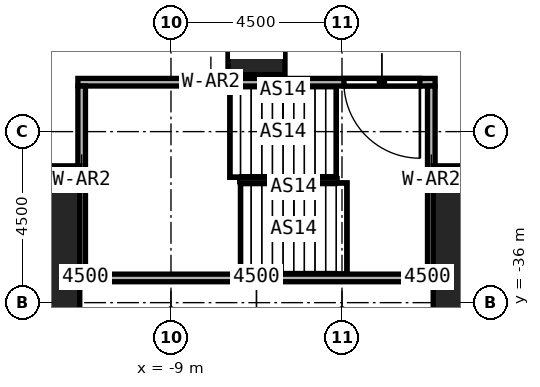
"""IFC4 building model, lengths in metres.
Left out: names, types, materials, properties, quantities, classifications, styles, units other than length and angle.
Written with IfcOpenShell. Run it as: python <this file> out.ifc"""

import sys

from ifc_helpers import new_model, si_unit, direction, frame, frame_2d, origin, origin_2d, place, context, subcontext, project, spatial, rectangle, extrude, element, fill, save


model = new_model("IFC4")
c1 = context("Model", 3, precision=1e-05, world=origin(), true_north=direction((0.0, 1.0)))
c2 = subcontext(c1, "Body", "Model", "MODEL_VIEW")
j1 = project(units=[si_unit("LENGTHUNIT", "METRE"), si_unit("PLANEANGLEUNIT", "RADIAN")], contexts=[c1])
p1 = place(None, origin())
s1 = spatial("IfcSite", under=j1, at=p1, CompositionType="ELEMENT")
p2 = place(p1, origin())
s2 = spatial("IfcBuilding", under=s1, at=p2, CompositionType="ELEMENT")
p3 = place(p2, frame((0.0, 0.0, 12.0)))
s3 = spatial("IfcBuildingStorey", under=s2, at=p3, CompositionType="ELEMENT", Elevation=12.0)
for number, where, z_axis, x_axis in (
    (1, (-13.5, -35.7, 0.0), (0.0, 0.0, 1.0), (1.0, 0.0, 0.0)),
    (2, (0.0, -35.7, 0.0), (0.0, 0.0, 1.0), (1.0, 0.0, 0.0)),
):
    element("IfcColumn", number, at=place(p3, frame(where, z_axis=z_axis, x_axis=x_axis)), inside=s3, PredefinedType="COLUMN", context=c2, shape_type="SweptSolid", body=[
        extrude(rectangle(XDim=4.2, YDim=6.6, at=origin_2d()), origin(), (0.0, 0.0, 1.0), 7.0),
    ])
p4 = place(p3, frame((-6.75, -29.25, 0.0), z_axis=(0.0, 0.0, 1.0), x_axis=(1.0, 0.0, 0.0)))
e3 = element("IfcColumn", 3, at=p4, inside=s3, PredefinedType="COLUMN", context=c2, shape_type="SweptSolid", body=[
    extrude(rectangle(XDim=1.5, YDim=1.5, at=origin_2d()), origin(), (0.0, 0.0, 1.0), 7.0),
])
p5 = place(p3, frame((-2.05, -30.2, 0.0), z_axis=(0.0, 0.0, 1.0), x_axis=(-1.0, 0.0, 0.0)))
e4 = element("IfcWall", 4, at=p5, inside=s3, PredefinedType="SOLIDWALL", context=c2, shape_type="SweptSolid", body=[
    extrude(rectangle(XDim=9.4, YDim=0.2, at=frame_2d((4.7, 0.0))), origin(), (0.0, 0.0, 1.0), 7.0),
])
p6 = place(p5, frame((0.4, 0.0, 0.0)))
e5 = element("IfcOpeningElement", 5, at=p6, cuts=e4, PredefinedType="OPENING", context=c2, shape_type="SweptSolid", body=[
    extrude(rectangle(XDim=2.0, YDim=2.4, at=frame_2d((1.0, 1.2))), frame((0.0, 0.1, 0.0), z_axis=(0.0, -1.0, 0.0), x_axis=(1.0, 0.0, 0.0)), (0.0, 0.0, 1.0), 0.2),
])
p7 = place(p3, frame((-11.45, -35.35, 0.0), z_axis=(0.0, 0.0, 1.0), x_axis=(1.0, 0.0, 0.0)))
e6 = element("IfcWall", 6, at=p7, inside=s3, PredefinedType="SOLIDWALL", context=c2, shape_type="SweptSolid", body=[
    extrude(rectangle(XDim=9.4, YDim=0.2, at=frame_2d((4.7, 0.0))), origin(), (0.0, 0.0, 1.0), 7.0),
])
for number, where, z_axis, x_axis in (
    (7, (-11.35, -35.25, 0.0), (0.0, 0.0, 1.0), (0.0, 1.0, 0.0)),
    (8, (-2.15, -35.25, 0.0), (0.0, 0.0, 1.0), (0.0, 1.0, 0.0)),
):
    element("IfcWall", number, at=place(p3, frame(where, z_axis=z_axis, x_axis=x_axis)), inside=s3, PredefinedType="SOLIDWALL", context=c2, shape_type="SweptSolid", body=[
        extrude(rectangle(XDim=4.95, YDim=0.2, at=frame_2d((2.475, 0.0))), origin(), (0.0, 0.0, 1.0), 7.0),
    ])
p8 = place(p6, origin())
e9 = element("IfcDoor", 9, at=p8, inside=s3, OperationType="DOUBLE_DOOR_SINGLE_SWING", PredefinedType="DOOR", context=c2, shape_type="SweptSolid", body=[
    extrude(rectangle(XDim=2.0, YDim=2.4, at=frame_2d((1.0, 1.2))), frame((0.0, 0.025, 0.0), z_axis=(0.0, -1.0, 0.0), x_axis=(1.0, 0.0, 0.0)), (0.0, 0.0, 1.0), 0.05),
])
fill(e5, e9)
save(model, sys.argv[1])
